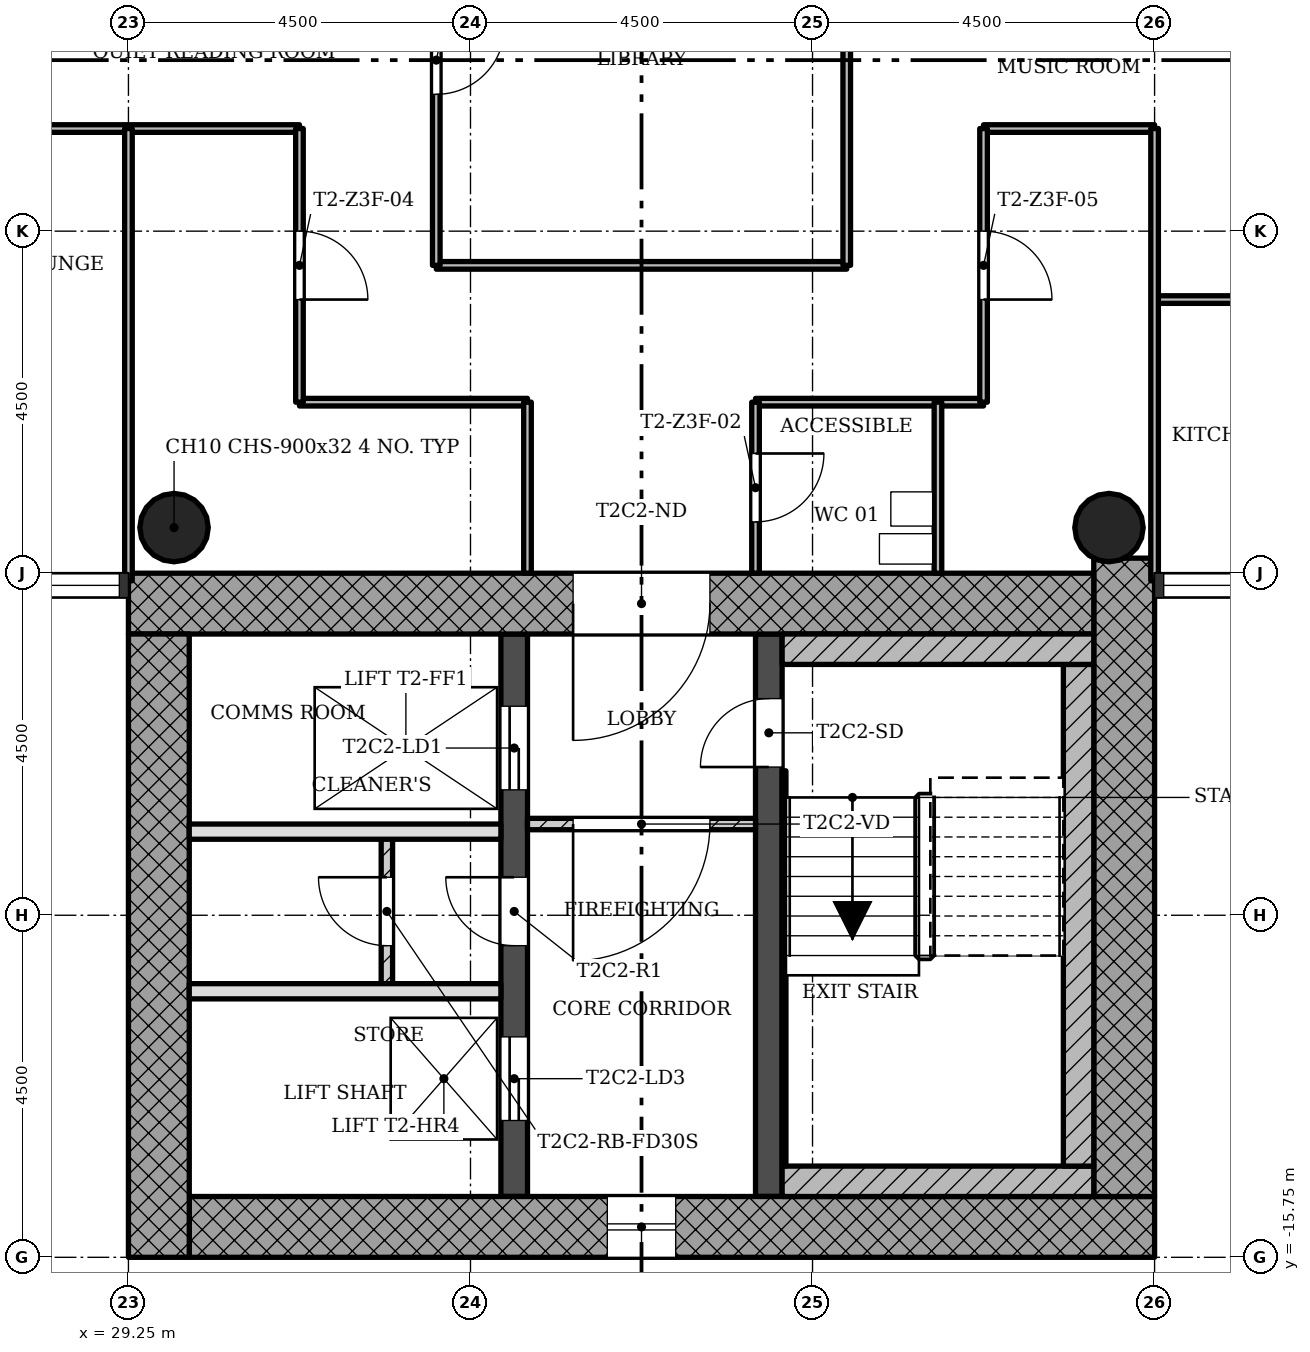
"""IFC4 building model, lengths in metres.
Left out: names, types, materials, properties, quantities, classifications, styles, units other than length and angle.
Written with IfcOpenShell. Run it as: python <this file> out.ifc"""

import sys

from ifc_helpers import new_model, si_unit, direction, frame, frame_2d, origin, origin_2d, place, context, subcontext, project, spatial, rectangle, hollow_circle, extrude, element, fill, save


model = new_model("IFC4")
c1 = context("Model", 3, precision=1e-05, world=origin(), true_north=direction((0.0, 1.0)))
c2 = subcontext(c1, "Body", "Model", "MODEL_VIEW")
j1 = project(units=[si_unit("LENGTHUNIT", "METRE"), si_unit("PLANEANGLEUNIT", "RADIAN")], contexts=[c1])
p1 = place(None, origin())
s1 = spatial("IfcSite", under=j1, at=p1, CompositionType="ELEMENT")
p2 = place(p1, origin())
s2 = spatial("IfcBuilding", under=s1, at=p2, CompositionType="ELEMENT")
p3 = place(p2, frame((0.0, 0.0, 167.7)))
s3 = spatial("IfcBuildingStorey", under=s2, at=p3, CompositionType="ELEMENT", Elevation=167.7)
p4 = place(p3, frame((30.05, -15.35, 0.0), z_axis=(0.0, 0.0, 1.0), x_axis=(1.0, 0.0, 0.0)))
e1 = element("IfcWall", 1, at=p4, inside=s3, PredefinedType="SHEAR", context=c2, shape_type="SweptSolid", body=[
    extrude(rectangle(XDim=12.7, YDim=0.8, at=frame_2d((6.35, 0.0))), origin(), (0.0, 0.0, 1.0), 3.4),
])
p5 = place(p4, frame((5.5, 0.0, 0.45)))
e2 = element("IfcOpeningElement", 2, at=p5, cuts=e1, PredefinedType="OPENING", context=c2, shape_type="SweptSolid", body=[
    extrude(rectangle(XDim=0.9, YDim=2.4, at=frame_2d((0.45, 1.2))), frame((0.0, 0.41, 0.0), z_axis=(0.0, -1.0, 0.0), x_axis=(1.0, 0.0, 0.0)), (0.0, 0.0, 1.0), 0.82),
])
p6 = place(p3, frame((42.35, -14.95, 0.0), z_axis=(0.0, 0.0, 1.0), x_axis=(0.0, 1.0, 0.0)))
e3 = element("IfcWall", 3, at=p6, inside=s3, PredefinedType="SHEAR", context=c2, shape_type="SweptSolid", body=[
    extrude(rectangle(XDim=8.398, YDim=0.8, at=frame_2d((4.199, 0.0))), origin(), (0.0, 0.0, 1.0), 3.4),
])
p7 = place(p3, frame((41.95, -7.15, 0.0), z_axis=(0.0, 0.0, 1.0), x_axis=(-1.0, 0.0, 0.0)))
e4 = element("IfcWall", 4, at=p7, inside=s3, PredefinedType="SHEAR", context=c2, shape_type="SweptSolid", body=[
    extrude(rectangle(XDim=12.7, YDim=0.8, at=frame_2d((6.35, 0.0))), origin(), (0.0, 0.0, 1.0), 3.4),
])
p8 = place(p7, frame((5.05, 0.0, 0.0)))
e5 = element("IfcOpeningElement", 5, at=p8, cuts=e4, PredefinedType="OPENING", context=c2, shape_type="SweptSolid", body=[
    extrude(rectangle(XDim=1.8, YDim=2.1, at=frame_2d((0.9, 1.05))), frame((0.0, 0.41, 0.0), z_axis=(0.0, -1.0, 0.0), x_axis=(1.0, 0.0, 0.0)), (0.0, 0.0, 1.0), 0.82),
])
p9 = place(p3, frame((29.65, -7.55, 0.0), z_axis=(0.0, 0.0, 1.0), x_axis=(0.0, -1.0, 0.0)))
e6 = element("IfcWall", 6, at=p9, inside=s3, PredefinedType="SHEAR", context=c2, shape_type="SweptSolid", body=[
    extrude(rectangle(XDim=8.2, YDim=0.8, at=frame_2d((4.1, 0.0))), origin(), (0.0, 0.0, 1.0), 3.4),
])
p10 = place(p3, frame((34.325, -14.95, 0.0), z_axis=(0.0, 0.0, 1.0), x_axis=(0.0, 1.0, 0.0)))
e7 = element("IfcWall", 7, at=p10, inside=s3, PredefinedType="SHEAR", context=c2, shape_type="SweptSolid", body=[
    extrude(rectangle(XDim=7.4, YDim=0.35, at=frame_2d((3.7, 0.0))), origin(), (0.0, 0.0, 1.0), 3.4),
])
p11 = place(p10, frame((5.35, 0.0, 0.0)))
e8 = element("IfcOpeningElement", 8, at=p11, cuts=e7, PredefinedType="OPENING", context=c2, shape_type="SweptSolid", body=[
    extrude(rectangle(XDim=1.1, YDim=2.1, at=frame_2d((0.55, 1.05))), frame((0.0, 0.185, 0.0), z_axis=(0.0, -1.0, 0.0), x_axis=(1.0, 0.0, 0.0)), (0.0, 0.0, 1.0), 0.37),
])
p12 = place(p10, frame((1.0, 0.0, 0.0)))
e9 = element("IfcOpeningElement", 9, at=p12, cuts=e7, PredefinedType="OPENING", context=c2, shape_type="SweptSolid", body=[
    extrude(rectangle(XDim=1.1, YDim=2.1, at=frame_2d((0.55, 1.05))), frame((0.0, 0.185, 0.0), z_axis=(0.0, -1.0, 0.0), x_axis=(1.0, 0.0, 0.0)), (0.0, 0.0, 1.0), 0.37),
])
p13 = place(p10, frame((3.3, 0.0, 0.0)))
e10 = element("IfcOpeningElement", 10, at=p13, cuts=e7, PredefinedType="OPENING", context=c2, shape_type="SweptSolid", body=[
    extrude(rectangle(XDim=0.9, YDim=2.1, at=frame_2d((0.45, 1.05))), frame((0.0, 0.185, 0.0), z_axis=(0.0, -1.0, 0.0), x_axis=(1.0, 0.0, 0.0)), (0.0, 0.0, 1.0), 0.37),
])
p14 = place(p3, frame((37.675, -14.95, 0.0), z_axis=(0.0, 0.0, 1.0), x_axis=(0.0, 1.0, 0.0)))
e11 = element("IfcWall", 11, at=p14, inside=s3, PredefinedType="SHEAR", context=c2, shape_type="SweptSolid", body=[
    extrude(rectangle(XDim=7.4, YDim=0.35, at=frame_2d((3.7, 0.0))), origin(), (0.0, 0.0, 1.0), 3.4),
])
p15 = place(p14, frame((5.65, 0.0, 0.0)))
e12 = element("IfcOpeningElement", 12, at=p15, cuts=e11, PredefinedType="OPENING", context=c2, shape_type="SweptSolid", body=[
    extrude(rectangle(XDim=0.9, YDim=2.1, at=frame_2d((0.45, 1.05))), frame((0.0, 0.185, 0.0), z_axis=(0.0, -1.0, 0.0), x_axis=(1.0, 0.0, 0.0)), (0.0, 0.0, 1.0), 0.37),
])
for number, where, z_axis, x_axis in (
    (13, (42.15, -6.15, 0.0), (0.0, 0.0, 1.0), (1.0, 0.0, 0.0)),
    (14, (29.85, -6.15, 0.0), (0.0, 0.0, 1.0), (1.0, 0.0, 0.0)),
):
    element("IfcColumn", number, at=place(p3, frame(where, z_axis=z_axis, x_axis=x_axis)), inside=s3, PredefinedType="COLUMN", context=c2, shape_type="SweptSolid", body=[
        extrude(hollow_circle(Radius=0.45, WallThickness=0.032, at=origin_2d()), origin(), (0.0, 0.0, 1.0), 3.4),
    ])
p16 = place(p3, frame((34.5, -10.05, 0.0), z_axis=(0.0, 0.0, 1.0), x_axis=(1.0, 0.0, 0.0)))
e15 = element("IfcWall", 15, at=p16, inside=s3, PredefinedType="PARTITIONING", context=c2, shape_type="SweptSolid", body=[
    extrude(rectangle(XDim=3.0, YDim=0.15, at=frame_2d((1.5, 0.0))), origin(), (0.0, 0.0, 1.0), 3.0),
])
p17 = place(p16, frame((0.6, 0.0, 0.0)))
e16 = element("IfcOpeningElement", 16, at=p17, cuts=e15, PredefinedType="OPENING", context=c2, shape_type="SweptSolid", body=[
    extrude(rectangle(XDim=1.8, YDim=2.1, at=frame_2d((0.9, 1.05))), frame((0.0, 0.085, 0.0), z_axis=(0.0, -1.0, 0.0), x_axis=(1.0, 0.0, 0.0)), (0.0, 0.0, 1.0), 0.17),
])
for number, where, z_axis, x_axis in (
    (17, (30.05, -12.25, 0.0), (0.0, 0.0, 1.0), (1.0, 0.0, 0.0)),
    (18, (30.05, -10.15, 0.0), (0.0, 0.0, 1.0), (1.0, 0.0, 0.0)),
):
    element("IfcWall", number, at=place(p3, frame(where, z_axis=z_axis, x_axis=x_axis)), inside=s3, PredefinedType="SOLIDWALL", context=c2, shape_type="SweptSolid", body=[
        extrude(rectangle(XDim=4.1, YDim=0.2, at=frame_2d((2.05, 0.0))), origin(), (0.0, 0.0, 1.0), 3.0),
    ])
p18 = place(p3, frame((32.65, -10.15, 0.0), z_axis=(0.0, 0.0, 1.0), x_axis=(0.0, -1.0, 0.0)))
e19 = element("IfcWall", 19, at=p18, inside=s3, PredefinedType="PARTITIONING", context=c2, shape_type="SweptSolid", body=[
    extrude(rectangle(XDim=2.1, YDim=0.15, at=frame_2d((1.05, 0.0))), origin(), (0.0, 0.0, 1.0), 3.0),
])
p19 = place(p18, frame((0.6, 0.0, 0.0)))
e20 = element("IfcOpeningElement", 20, at=p19, cuts=e19, PredefinedType="OPENING", context=c2, shape_type="SweptSolid", body=[
    extrude(rectangle(XDim=0.9, YDim=2.1, at=frame_2d((0.45, 1.05))), frame((0.0, 0.085, 0.0), z_axis=(0.0, -1.0, 0.0), x_axis=(1.0, 0.0, 0.0)), (0.0, 0.0, 1.0), 0.17),
])
for number, where, z_axis, x_axis in (
    (21, (40.5, -4.5, 0.0), (0.0, 0.0, 1.0), (-1.0, 0.0, 0.0)),
    (22, (34.5, -4.5, 0.0), (0.0, 0.0, 1.0), (-1.0, 0.0, 0.0)),
):
    element("IfcWall", number, at=place(p3, frame(where, z_axis=z_axis, x_axis=x_axis)), inside=s3, PredefinedType="PARTITIONING", context=c2, shape_type="SweptSolid", body=[
        extrude(rectangle(XDim=3.0, YDim=0.1, at=frame_2d((1.5, 0.0))), origin(), (0.0, 0.0, 1.0), 3.0),
    ])
p20 = place(p3, frame((47.25, -3.15, 0.0), z_axis=(0.0, 0.0, 1.0), x_axis=(-1.0, 0.0, 0.0)))
e23 = element("IfcWall", 23, at=p20, inside=s3, PredefinedType="PARTITIONING", context=c2, shape_type="SweptSolid", body=[
    extrude(rectangle(XDim=4.5, YDim=0.1, at=frame_2d((2.25, 0.0))), origin(), (0.0, 0.0, 1.0), 3.0),
])
p21 = place(p20, frame((1.8, 0.0, 0.0)))
e24 = element("IfcOpeningElement", 24, at=p21, cuts=e23, PredefinedType="OPENING", context=c2, shape_type="SweptSolid", body=[
    extrude(rectangle(XDim=0.9, YDim=2.1, at=frame_2d((0.45, 1.05))), frame((0.0, 0.06, 0.0), z_axis=(0.0, -1.0, 0.0), x_axis=(1.0, 0.0, 0.0)), (0.0, 0.0, 1.0), 0.12),
])
p22 = place(p3, frame((38.7, -2.7, 0.0), z_axis=(0.0, 0.0, 1.0), x_axis=(-1.0, 0.0, 0.0)))
e25 = element("IfcWall", 25, at=p22, inside=s3, PredefinedType="PARTITIONING", context=c2, shape_type="SweptSolid", body=[
    extrude(rectangle(XDim=5.4, YDim=0.1, at=frame_2d((2.7, 0.0))), origin(), (0.0, 0.0, 1.0), 3.0),
])
p23 = place(p3, frame((42.75, -0.9, 0.0), z_axis=(0.0, 0.0, 1.0), x_axis=(-1.0, 0.0, 0.0)))
e26 = element("IfcWall", 26, at=p23, inside=s3, PredefinedType="PARTITIONING", context=c2, shape_type="SweptSolid", body=[
    extrude(rectangle(XDim=2.25, YDim=0.1, at=frame_2d((1.125, 0.0))), origin(), (0.0, 0.0, 1.0), 3.0),
])
p24 = place(p3, frame((31.5, -0.9, 0.0), z_axis=(0.0, 0.0, 1.0), x_axis=(-1.0, 0.0, 0.0)))
e27 = element("IfcWall", 27, at=p24, inside=s3, PredefinedType="PARTITIONING", context=c2, shape_type="SweptSolid", body=[
    extrude(rectangle(XDim=6.75, YDim=0.1, at=frame_2d((3.375, 0.0))), origin(), (0.0, 0.0, 1.0), 3.0),
])
p25 = place(p24, frame((4.05, 0.0, 0.0)))
e28 = element("IfcOpeningElement", 28, at=p25, cuts=e27, PredefinedType="OPENING", context=c2, shape_type="SweptSolid", body=[
    extrude(rectangle(XDim=0.9, YDim=2.1, at=frame_2d((0.45, 1.05))), frame((0.0, 0.06, 0.0), z_axis=(0.0, -1.0, 0.0), x_axis=(1.0, 0.0, 0.0)), (0.0, 0.0, 1.0), 0.12),
])
p26 = place(p3, frame((42.75, -6.85, 0.0), z_axis=(0.0, 0.0, 1.0), x_axis=(0.0, 1.0, 0.0)))
e29 = element("IfcWall", 29, at=p26, inside=s3, PredefinedType="PARTITIONING", context=c2, shape_type="SweptSolid", body=[
    extrude(rectangle(XDim=5.95, YDim=0.1, at=frame_2d((2.975, 0.0))), origin(), (0.0, 0.0, 1.0), 3.0),
])
p27 = place(p3, frame((40.5, -4.5, 0.0), z_axis=(0.0, 0.0, 1.0), x_axis=(0.0, 1.0, 0.0)))
e30 = element("IfcWall", 30, at=p27, inside=s3, PredefinedType="PARTITIONING", context=c2, shape_type="SweptSolid", body=[
    extrude(rectangle(XDim=3.6, YDim=0.1, at=frame_2d((1.8, 0.0))), origin(), (0.0, 0.0, 1.0), 3.0),
])
p28 = place(p27, frame((1.35, 0.0, 0.0)))
e31 = element("IfcOpeningElement", 31, at=p28, cuts=e30, PredefinedType="OPENING", context=c2, shape_type="SweptSolid", body=[
    extrude(rectangle(XDim=0.9, YDim=2.1, at=frame_2d((0.45, 1.05))), frame((0.0, 0.06, 0.0), z_axis=(0.0, -1.0, 0.0), x_axis=(1.0, 0.0, 0.0)), (0.0, 0.0, 1.0), 0.12),
])
p29 = place(p3, frame((39.9, -6.75, 0.0), z_axis=(0.0, 0.0, 1.0), x_axis=(0.0, 1.0, 0.0)))
e32 = element("IfcWall", 32, at=p29, inside=s3, PredefinedType="PARTITIONING", context=c2, shape_type="SweptSolid", body=[
    extrude(rectangle(XDim=2.25, YDim=0.1, at=frame_2d((1.125, 0.0))), origin(), (0.0, 0.0, 1.0), 3.0),
])
p30 = place(p3, frame((38.7, -2.7, 0.0), z_axis=(0.0, 0.0, 1.0), x_axis=(0.0, 1.0, 0.0)))
e33 = element("IfcWall", 33, at=p30, inside=s3, PredefinedType="PARTITIONING", context=c2, shape_type="SweptSolid", body=[
    extrude(rectangle(XDim=5.4, YDim=0.1, at=frame_2d((2.7, 0.0))), origin(), (0.0, 0.0, 1.0), 3.0),
])
p31 = place(p3, frame((37.5, -6.75, 0.0), z_axis=(0.0, 0.0, 1.0), x_axis=(0.0, 1.0, 0.0)))
e34 = element("IfcWall", 34, at=p31, inside=s3, PredefinedType="PARTITIONING", context=c2, shape_type="SweptSolid", body=[
    extrude(rectangle(XDim=2.25, YDim=0.1, at=frame_2d((1.125, 0.0))), origin(), (0.0, 0.0, 1.0), 3.0),
])
p32 = place(p31, frame((0.675, 0.0, 0.0)))
e35 = element("IfcOpeningElement", 35, at=p32, cuts=e34, PredefinedType="OPENING", context=c2, shape_type="SweptSolid", body=[
    extrude(rectangle(XDim=0.9, YDim=2.1, at=frame_2d((0.45, 1.05))), frame((0.0, 0.06, 0.0), z_axis=(0.0, -1.0, 0.0), x_axis=(1.0, 0.0, 0.0)), (0.0, 0.0, 1.0), 0.12),
])
p33 = place(p3, frame((34.5, -6.75, 0.0), z_axis=(0.0, 0.0, 1.0), x_axis=(0.0, 1.0, 0.0)))
e36 = element("IfcWall", 36, at=p33, inside=s3, PredefinedType="PARTITIONING", context=c2, shape_type="SweptSolid", body=[
    extrude(rectangle(XDim=2.25, YDim=0.1, at=frame_2d((1.125, 0.0))), origin(), (0.0, 0.0, 1.0), 3.0),
])
p34 = place(p3, frame((33.3, -2.7, 0.0), z_axis=(0.0, 0.0, 1.0), x_axis=(0.0, 1.0, 0.0)))
e37 = element("IfcWall", 37, at=p34, inside=s3, PredefinedType="PARTITIONING", context=c2, shape_type="SweptSolid", body=[
    extrude(rectangle(XDim=5.4, YDim=0.1, at=frame_2d((2.7, 0.0))), origin(), (0.0, 0.0, 1.0), 3.0),
])
p35 = place(p34, frame((2.25, 0.0, 0.0)))
e38 = element("IfcOpeningElement", 38, at=p35, cuts=e37, PredefinedType="OPENING", context=c2, shape_type="SweptSolid", body=[
    extrude(rectangle(XDim=0.9, YDim=2.1, at=frame_2d((0.45, 1.05))), frame((0.0, 0.06, 0.0), z_axis=(0.0, -1.0, 0.0), x_axis=(1.0, 0.0, 0.0)), (0.0, 0.0, 1.0), 0.12),
])
p36 = place(p3, frame((31.5, -4.5, 0.0), z_axis=(0.0, 0.0, 1.0), x_axis=(0.0, 1.0, 0.0)))
e39 = element("IfcWall", 39, at=p36, inside=s3, PredefinedType="PARTITIONING", context=c2, shape_type="SweptSolid", body=[
    extrude(rectangle(XDim=3.6, YDim=0.1, at=frame_2d((1.8, 0.0))), origin(), (0.0, 0.0, 1.0), 3.0),
])
p37 = place(p36, frame((1.35, 0.0, 0.0)))
e40 = element("IfcOpeningElement", 40, at=p37, cuts=e39, PredefinedType="OPENING", context=c2, shape_type="SweptSolid", body=[
    extrude(rectangle(XDim=0.9, YDim=2.1, at=frame_2d((0.45, 1.05))), frame((0.0, 0.06, 0.0), z_axis=(0.0, -1.0, 0.0), x_axis=(1.0, 0.0, 0.0)), (0.0, 0.0, 1.0), 0.12),
])
p38 = place(p3, frame((29.25, -6.85, 0.0), z_axis=(0.0, 0.0, 1.0), x_axis=(0.0, 1.0, 0.0)))
e41 = element("IfcWall", 41, at=p38, inside=s3, PredefinedType="PARTITIONING", context=c2, shape_type="SweptSolid", body=[
    extrude(rectangle(XDim=5.95, YDim=0.1, at=frame_2d((2.975, 0.0))), origin(), (0.0, 0.0, 1.0), 3.0),
])
p39 = place(p3, frame((37.85, -14.75, 0.0), z_axis=(0.0, 0.0, 1.0), x_axis=(1.0, 0.0, 0.0)))
e42 = element("IfcWall", 42, at=p39, inside=s3, PredefinedType="SHEAR", context=c2, shape_type="SweptSolid", body=[
    extrude(rectangle(XDim=4.1, YDim=0.4, at=frame_2d((2.05, 0.0))), origin(), (0.0, 0.0, 1.0), 3.4),
])
p40 = place(p3, frame((41.75, -7.95, 0.0), z_axis=(0.0, 0.0, 1.0), x_axis=(0.0, -1.0, 0.0)))
e43 = element("IfcWall", 43, at=p40, inside=s3, PredefinedType="SHEAR", context=c2, shape_type="SweptSolid", body=[
    extrude(rectangle(XDim=6.6, YDim=0.4, at=frame_2d((3.3, 0.0))), origin(), (0.0, 0.0, 1.0), 3.4),
])
p41 = place(p3, frame((37.85, -7.75, 0.0), z_axis=(0.0, 0.0, 1.0), x_axis=(1.0, 0.0, 0.0)))
e44 = element("IfcWall", 44, at=p41, inside=s3, PredefinedType="SHEAR", context=c2, shape_type="SweptSolid", body=[
    extrude(rectangle(XDim=4.1, YDim=0.4, at=frame_2d((2.05, 0.0))), origin(), (0.0, 0.0, 1.0), 3.4),
])
p42 = place(p3, frame((37.875, -9.35, 0.0), z_axis=(0.0, 0.0, 1.0), x_axis=(0.0, -1.0, 0.0)))
e45 = element("IfcWall", 45, at=p42, inside=s3, PredefinedType="SHEAR", context=c2, shape_type="SweptSolid", body=[
    extrude(rectangle(XDim=5.2, YDim=0.05, at=frame_2d((2.6, 0.0))), origin(), (0.0, 0.0, 1.0), 3.4),
])
p43 = place(p5, origin())
e46 = element("IfcWindow", 46, at=p43, inside=s3, PartitioningType="SINGLE_PANEL", PredefinedType="WINDOW", context=c2, shape_type="SweptSolid", body=[
    extrude(rectangle(XDim=0.9, YDim=2.4, at=frame_2d((0.45, 1.2))), frame((0.0, 0.03, 0.0), z_axis=(0.0, -1.0, 0.0), x_axis=(1.0, 0.0, 0.0)), (0.0, 0.0, 1.0), 0.06),
])
fill(e2, e46)
p44 = place(p17, origin())
e47 = element("IfcDoor", 47, at=p44, inside=s3, OperationType="SINGLE_SWING_LEFT", PredefinedType="DOOR", context=c2, shape_type="SweptSolid", body=[
    extrude(rectangle(XDim=1.8, YDim=2.1, at=frame_2d((0.9, 1.05))), frame((0.0, 0.025, 0.0), z_axis=(0.0, -1.0, 0.0), x_axis=(1.0, 0.0, 0.0)), (0.0, 0.0, 1.0), 0.05),
])
fill(e16, e47)
p45 = place(p19, origin())
e48 = element("IfcDoor", 48, at=p45, inside=s3, OperationType="SINGLE_SWING_LEFT", PredefinedType="DOOR", context=c2, shape_type="SweptSolid", body=[
    extrude(rectangle(XDim=0.9, YDim=2.1, at=frame_2d((0.45, 1.05))), frame((0.0, 0.025, 0.0), z_axis=(0.0, -1.0, 0.0), x_axis=(1.0, 0.0, 0.0)), (0.0, 0.0, 1.0), 0.05),
])
fill(e20, e48)
p46 = place(p35, origin())
e49 = element("IfcDoor", 49, at=p46, inside=s3, OperationType="SINGLE_SWING_RIGHT", PredefinedType="DOOR", context=c2, shape_type="SweptSolid", body=[
    extrude(rectangle(XDim=0.9, YDim=2.1, at=frame_2d((0.45, 1.05))), frame((0.0, 0.025, 0.0), z_axis=(0.0, -1.0, 0.0), x_axis=(1.0, 0.0, 0.0)), (0.0, 0.0, 1.0), 0.05),
])
fill(e38, e49)
p47 = place(p32, origin())
e50 = element("IfcDoor", 50, at=p47, inside=s3, OperationType="SINGLE_SWING_RIGHT", PredefinedType="DOOR", context=c2, shape_type="SweptSolid", body=[
    extrude(rectangle(XDim=0.9, YDim=2.1, at=frame_2d((0.45, 1.05))), frame((0.0, 0.025, 0.0), z_axis=(0.0, -1.0, 0.0), x_axis=(1.0, 0.0, 0.0)), (0.0, 0.0, 1.0), 0.05),
])
fill(e35, e50)
p48 = place(p37, origin())
e51 = element("IfcDoor", 51, at=p48, inside=s3, OperationType="SINGLE_SWING_LEFT", PredefinedType="DOOR", context=c2, shape_type="SweptSolid", body=[
    extrude(rectangle(XDim=0.9, YDim=2.1, at=frame_2d((0.45, 1.05))), frame((0.0, 0.025, 0.0), z_axis=(0.0, -1.0, 0.0), x_axis=(1.0, 0.0, 0.0)), (0.0, 0.0, 1.0), 0.05),
])
fill(e40, e51)
p49 = place(p28, origin())
e52 = element("IfcDoor", 52, at=p49, inside=s3, OperationType="SINGLE_SWING_LEFT", PredefinedType="DOOR", context=c2, shape_type="SweptSolid", body=[
    extrude(rectangle(XDim=0.9, YDim=2.1, at=frame_2d((0.45, 1.05))), frame((0.0, 0.025, 0.0), z_axis=(0.0, -1.0, 0.0), x_axis=(1.0, 0.0, 0.0)), (0.0, 0.0, 1.0), 0.05),
])
fill(e31, e52)
p50 = place(p15, origin())
e53 = element("IfcDoor", 53, at=p50, inside=s3, OperationType="SINGLE_SWING_RIGHT", PredefinedType="DOOR", context=c2, shape_type="SweptSolid", body=[
    extrude(rectangle(XDim=0.9, YDim=2.1, at=frame_2d((0.45, 1.05))), frame((0.0, 0.025, 0.0), z_axis=(0.0, -1.0, 0.0), x_axis=(1.0, 0.0, 0.0)), (0.0, 0.0, 1.0), 0.05),
])
fill(e12, e53)
p51 = place(p11, origin())
e54 = element("IfcDoor", 54, at=p51, inside=s3, OperationType="SLIDING_TO_LEFT", PredefinedType="DOOR", context=c2, shape_type="SweptSolid", body=[
    extrude(rectangle(XDim=1.1, YDim=2.1, at=frame_2d((0.55, 1.05))), frame((0.0, 0.025, 0.0), z_axis=(0.0, -1.0, 0.0), x_axis=(1.0, 0.0, 0.0)), (0.0, 0.0, 1.0), 0.05),
])
fill(e8, e54)
p52 = place(p12, origin())
e55 = element("IfcDoor", 55, at=p52, inside=s3, OperationType="SLIDING_TO_LEFT", PredefinedType="DOOR", context=c2, shape_type="SweptSolid", body=[
    extrude(rectangle(XDim=1.1, YDim=2.1, at=frame_2d((0.55, 1.05))), frame((0.0, 0.025, 0.0), z_axis=(0.0, -1.0, 0.0), x_axis=(1.0, 0.0, 0.0)), (0.0, 0.0, 1.0), 0.05),
])
fill(e9, e55)
p53 = place(p13, origin())
e56 = element("IfcDoor", 56, at=p53, inside=s3, OperationType="SINGLE_SWING_LEFT", PredefinedType="DOOR", context=c2, shape_type="SweptSolid", body=[
    extrude(rectangle(XDim=0.9, YDim=2.1, at=frame_2d((0.45, 1.05))), frame((0.0, 0.025, 0.0), z_axis=(0.0, -1.0, 0.0), x_axis=(1.0, 0.0, 0.0)), (0.0, 0.0, 1.0), 0.05),
])
fill(e10, e56)
p54 = place(p8, origin())
e57 = element("IfcDoor", 57, at=p54, inside=s3, OperationType="SINGLE_SWING_LEFT", PredefinedType="DOOR", context=c2, shape_type="SweptSolid", body=[
    extrude(rectangle(XDim=1.8, YDim=2.1, at=frame_2d((0.9, 1.05))), frame((0.0, 0.025, 0.0), z_axis=(0.0, -1.0, 0.0), x_axis=(1.0, 0.0, 0.0)), (0.0, 0.0, 1.0), 0.05),
])
fill(e5, e57)
save(model, sys.argv[1])
